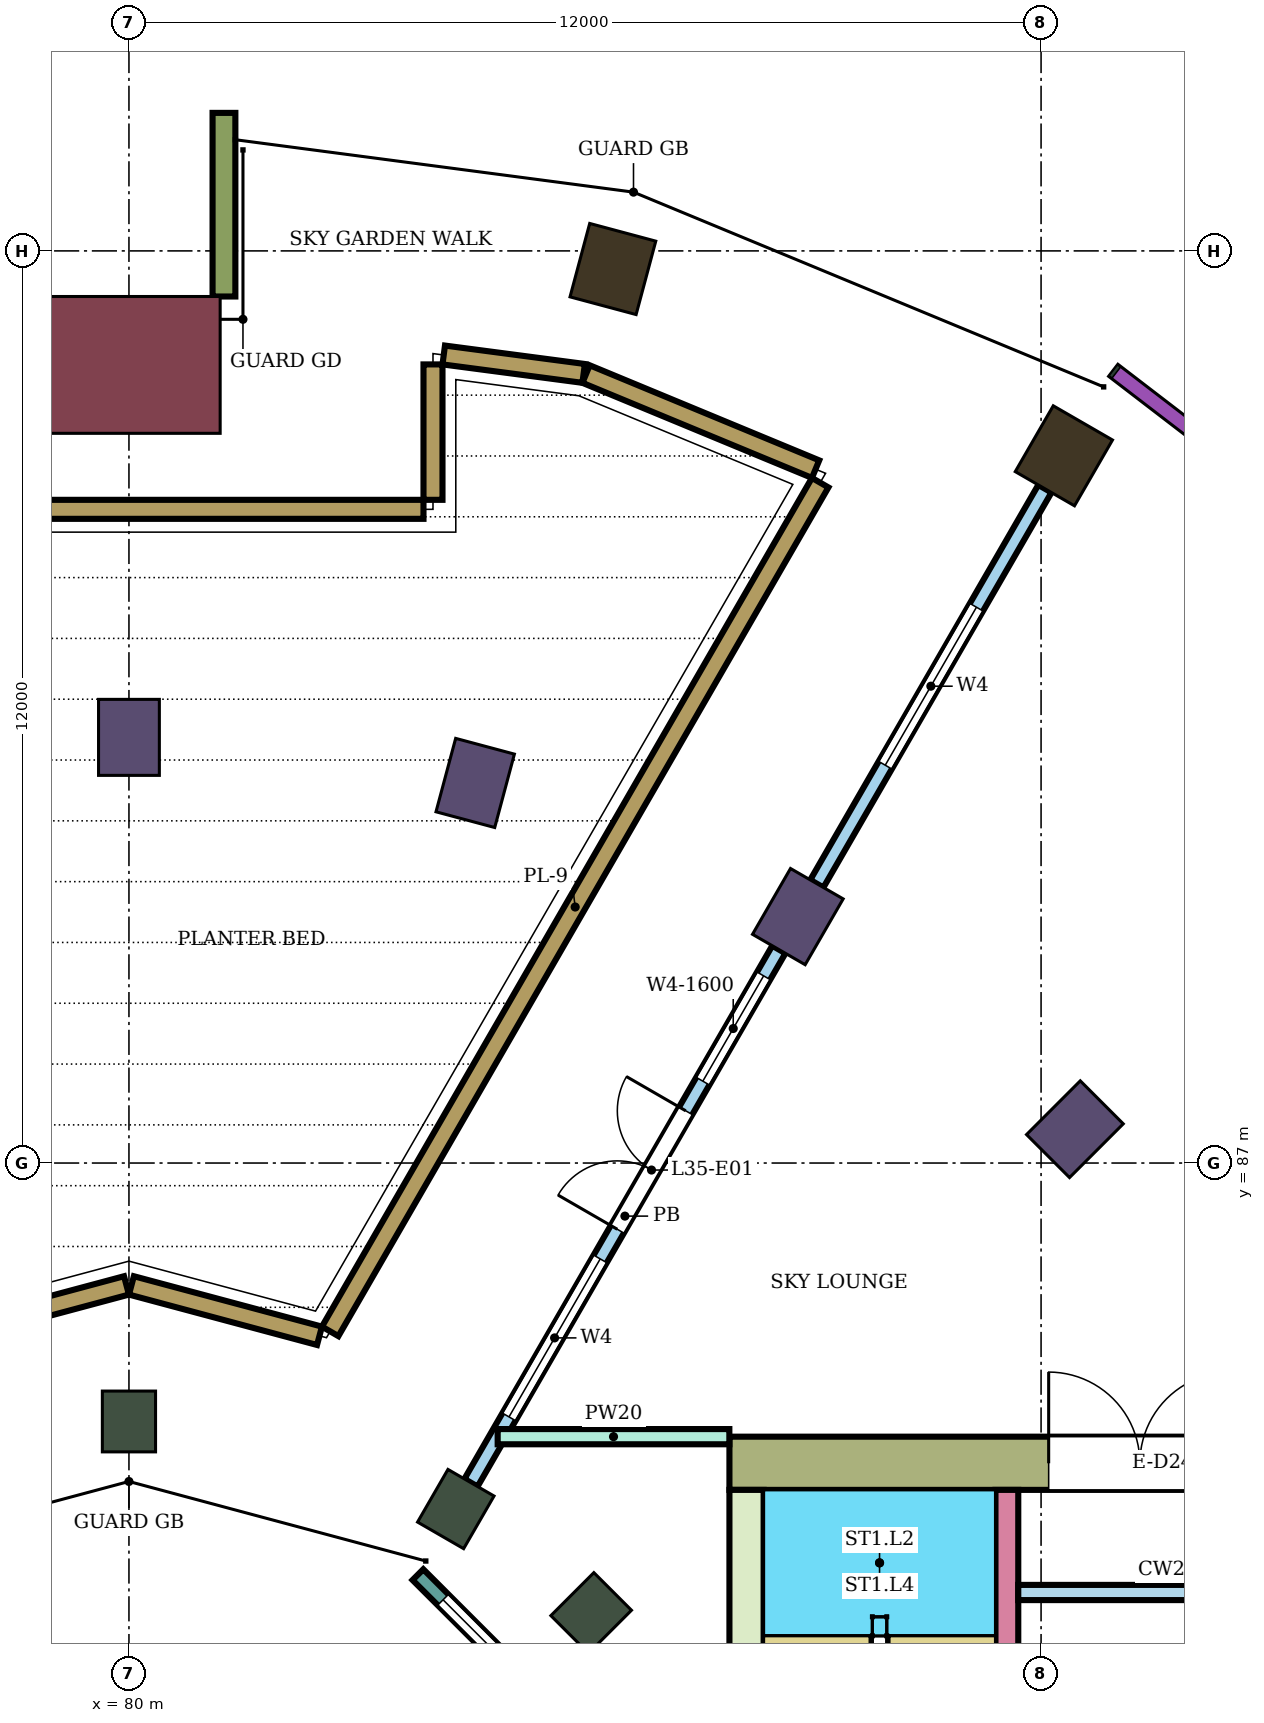
"""IFC4 building model, lengths in metres.
Left out: names, types, materials, properties, quantities, classifications, styles, units other than length and angle.
Written with IfcOpenShell. Run it as: python <this file> out.ifc"""

import sys

from ifc_helpers import new_model, si_unit, direction, frame, frame_2d, origin, origin_2d, place, context, subcontext, project, spatial, rectangle, extrude, element, fill, save


model = new_model("IFC4")
c1 = context("Model", 3, precision=1e-05, world=origin(), true_north=direction((0.0, 1.0)))
c2 = subcontext(c1, "Body", "Model", "MODEL_VIEW")
j1 = project(units=[si_unit("LENGTHUNIT", "METRE"), si_unit("PLANEANGLEUNIT", "RADIAN")], contexts=[c1])
p1 = place(None, origin())
s1 = spatial("IfcSite", under=j1, at=p1, CompositionType="ELEMENT")
p2 = place(p1, origin())
s2 = spatial("IfcBuilding", under=s1, at=p2, CompositionType="ELEMENT")
p3 = place(p2, frame((0.0, 0.0, 149.7)))
s3 = spatial("IfcBuildingStorey", under=s2, at=p3, CompositionType="ELEMENT", Elevation=149.7)
for number, where, z_axis, x_axis in (
    (1, (92.3, 96.304, 0.0), (0.0, 0.0, 1.0), (0.5, 0.866, 0.0)),
    (2, (86.367, 98.762, 0.0), (0.0, 0.0, 1.0), (0.259, 0.966, 0.0)),
):
    element("IfcColumn", number, at=place(p3, frame(where, z_axis=z_axis, x_axis=x_axis)), inside=s3, PredefinedType="COLUMN", context=c2, shape_type="SweptSolid", body=[
        extrude(rectangle(XDim=1.0, YDim=0.9, at=origin_2d()), origin(), (0.0, 0.0, 1.0), 8.0),
    ])
for number, where, z_axis, x_axis in (
    (3, (92.445, 87.445, 0.0), (0.0, 0.0, 1.0), (0.707, 0.707, 0.0)),
    (4, (88.8, 90.242, 0.0), (0.0, 0.0, 1.0), (0.5, 0.866, 0.0)),
    (5, (84.555, 92.0, 0.0), (0.0, 0.0, 1.0), (0.259, 0.966, 0.0)),
    (6, (80.0, 92.6, 0.0), (0.0, 0.0, 1.0), (0.0, 1.0, 0.0)),
):
    element("IfcColumn", number, at=place(p3, frame(where, z_axis=z_axis, x_axis=x_axis)), inside=s3, PredefinedType="COLUMN", context=c2, shape_type="SweptSolid", body=[
        extrude(rectangle(XDim=1.0, YDim=0.8, at=origin_2d()), origin(), (0.0, 0.0, 1.0), 8.0),
    ])
for number, where, z_axis, x_axis in (
    (7, (86.081, 81.081, 0.0), (0.0, 0.0, 1.0), (0.707, 0.707, 0.0)),
    (8, (84.3, 82.448, 0.0), (0.0, 0.0, 1.0), (0.5, 0.866, 0.0)),
    (9, (80.0, 83.6, 0.0), (0.0, 0.0, 1.0), (0.0, 1.0, 0.0)),
):
    element("IfcColumn", number, at=place(p3, frame(where, z_axis=z_axis, x_axis=x_axis)), inside=s3, PredefinedType="COLUMN", context=c2, shape_type="SweptSolid", body=[
        extrude(rectangle(XDim=0.8, YDim=0.7, at=origin_2d()), origin(), (0.0, 0.0, 1.0), 8.0),
    ])
p4 = place(p3, frame((80.0, 97.5, 0.0), z_axis=(0.0, 0.0, 1.0), x_axis=(0.0, 1.0, 0.0)))
e10 = element("IfcColumn", 10, at=p4, inside=s3, PredefinedType="COLUMN", context=c2, shape_type="SweptSolid", body=[
    extrude(rectangle(XDim=1.8, YDim=2.4, at=origin_2d()), origin(), (0.0, 0.0, 1.0), 8.0),
])
p5 = place(p3, frame((87.9, 83.05, 0.0), z_axis=(0.0, 0.0, 1.0), x_axis=(1.0, 0.0, 0.0)))
e11 = element("IfcWall", 11, at=p5, inside=s3, PredefinedType="SHEAR", context=c2, shape_type="SweptSolid", body=[
    extrude(rectangle(XDim=14.8, YDim=0.7, at=frame_2d((7.4, 0.0))), origin(), (0.0, 0.0, 1.0), 7.68),
])
p6 = place(p5, frame((4.2, 0.0, 0.0)))
e12 = element("IfcOpeningElement", 12, at=p6, cuts=e11, PredefinedType="OPENING", context=c2, shape_type="SweptSolid", body=[
    extrude(rectangle(XDim=2.4, YDim=2.4, at=frame_2d((1.2, 1.2))), frame((0.0, 0.36, 0.0), z_axis=(0.0, -1.0, 0.0), x_axis=(1.0, 0.0, 0.0)), (0.0, 0.0, 1.0), 0.72),
])
p7 = place(p3, frame((88.125, 75.0, 0.0), z_axis=(0.0, 0.0, 1.0), x_axis=(0.0, 1.0, 0.0)))
e13 = element("IfcWall", 13, at=p7, inside=s3, PredefinedType="SHEAR", context=c2, shape_type="SweptSolid", body=[
    extrude(rectangle(XDim=7.7, YDim=0.45, at=frame_2d((3.85, 0.0))), origin(), (0.0, 0.0, 1.0), 7.68),
])
p8 = place(p3, frame((91.55, 75.0, 0.0), z_axis=(0.0, 0.0, 1.0), x_axis=(0.0, 1.0, 0.0)))
e14 = element("IfcWall", 14, at=p8, inside=s3, PredefinedType="SHEAR", context=c2, shape_type="SweptSolid", body=[
    extrude(rectangle(XDim=7.7, YDim=0.3, at=frame_2d((3.85, 0.0))), origin(), (0.0, 0.0, 1.0), 7.68),
])
p9 = place(p8, frame((1.85, 0.0, 0.0)))
e15 = element("IfcOpeningElement", 15, at=p9, cuts=e14, PredefinedType="OPENING", context=c2, shape_type="SweptSolid", body=[
    extrude(rectangle(XDim=0.9, YDim=2.1, at=frame_2d((0.45, 1.05))), frame((0.0, 0.16, 0.0), z_axis=(0.0, -1.0, 0.0), x_axis=(1.0, 0.0, 0.0)), (0.0, 0.0, 1.0), 0.32),
])
p10 = place(p3, frame((91.7, 81.35, 0.0), z_axis=(0.0, 0.0, 1.0), x_axis=(1.0, 0.0, 0.0)))
e16 = element("IfcWall", 16, at=p10, inside=s3, PredefinedType="SHEAR", context=c2, shape_type="SweptSolid", body=[
    extrude(rectangle(XDim=4.5, YDim=0.2, at=frame_2d((2.25, 0.0))), origin(), (0.0, 0.0, 1.0), 7.68),
])
p11 = place(p3, frame((81.25, 98.4, 0.0), z_axis=(0.0, 0.0, 1.0), x_axis=(0.0, 1.0, 0.0)))
e17 = element("IfcWall", 17, at=p11, inside=s3, PredefinedType="NOTDEFINED", context=c2, shape_type="SweptSolid", body=[
    extrude(rectangle(XDim=2.416, YDim=0.3, at=frame_2d((1.208, 0.0))), origin(), (0.0, 0.0, 1.0), 8.0),
])
p12 = place(p3, frame((86.585, 78.802, 0.0), z_axis=(0.0, 0.0, 1.0), x_axis=(-0.707106781187, 0.707106781187, 0.0)))
e18 = element("IfcWall", 18, at=p12, inside=s3, PredefinedType="NOTDEFINED", context=c2, shape_type="SweptSolid", body=[
    extrude(rectangle(XDim=3.936, YDim=0.2, at=frame_2d((1.968, 0.0))), origin(), (0.0, 0.0, 1.0), 8.0),
])
p13 = place(p12, frame((0.468, 0.0, 0.9)))
e19 = element("IfcOpeningElement", 19, at=p13, cuts=e18, PredefinedType="OPENING", context=c2, shape_type="SweptSolid", body=[
    extrude(rectangle(XDim=3.0, YDim=2.3, at=frame_2d((1.5, 1.15))), frame((0.0, 0.11, 0.0), z_axis=(0.0, -1.0, 0.0), x_axis=(1.0, 0.0, 0.0)), (0.0, 0.0, 1.0), 0.22),
])
for number, where, z_axis, x_axis in (
    (20, (77.493, 84.727, 0.0), (0.0, 0.0, 1.0), (0.966, 0.259, 0.0)),
    (21, (80.032, 85.39, 0.0), (0.0, 0.0, 1.0), (0.966, -0.259, 0.0)),
):
    element("IfcWall", number, at=place(p3, frame(where, z_axis=z_axis, x_axis=x_axis)), inside=s3, PredefinedType="USERDEFINED", context=c2, shape_type="SweptSolid", body=[
        extrude(rectangle(XDim=2.562, YDim=0.25, at=frame_2d((1.281, 0.0))), origin(), (0.0, 0.0, 1.0), 0.6),
    ])
p14 = place(p3, frame((82.647, 84.785, 0.0), z_axis=(0.0, 0.0, 1.0), x_axis=(0.499992370413, 0.866029808684, 0.0)))
e22 = element("IfcWall", 22, at=p14, inside=s3, PredefinedType="USERDEFINED", context=c2, shape_type="SweptSolid", body=[
    extrude(rectangle(XDim=12.893, YDim=0.25, at=frame_2d((6.446, 0.0))), origin(), (0.0, 0.0, 1.0), 0.6),
])
p15 = place(p3, frame((89.033, 96.129, 0.0), z_axis=(0.0, 0.0, 1.0), x_axis=(-0.923863886655, 0.382721202621, 0.0)))
e23 = element("IfcWall", 23, at=p15, inside=s3, PredefinedType="USERDEFINED", context=c2, shape_type="SweptSolid", body=[
    extrude(rectangle(XDim=3.269, YDim=0.25, at=frame_2d((1.634, 0.0))), origin(), (0.0, 0.0, 1.0), 0.6),
])
p16 = place(p3, frame((85.982, 97.388, 0.0), z_axis=(0.0, 0.0, 1.0), x_axis=(-0.991436829887, 0.130587182926, 0.0)))
e24 = element("IfcWall", 24, at=p16, inside=s3, PredefinedType="USERDEFINED", context=c2, shape_type="SweptSolid", body=[
    extrude(rectangle(XDim=1.856, YDim=0.25, at=frame_2d((0.928, 0.0))), origin(), (0.0, 0.0, 1.0), 0.6),
])
p17 = place(p3, frame((84.0, 97.507, 0.0), z_axis=(0.0, 0.0, 1.0), x_axis=(0.0, -1.0, 0.0)))
e25 = element("IfcWall", 25, at=p17, inside=s3, PredefinedType="USERDEFINED", context=c2, shape_type="SweptSolid", body=[
    extrude(rectangle(XDim=1.781, YDim=0.25, at=frame_2d((0.891, 0.0))), origin(), (0.0, 0.0, 1.0), 0.6),
])
p18 = place(p3, frame((83.875, 95.6, 0.0), z_axis=(0.0, 0.0, 1.0), x_axis=(-1.0, 0.0, 0.0)))
e26 = element("IfcWall", 26, at=p18, inside=s3, PredefinedType="USERDEFINED", context=c2, shape_type="SweptSolid", body=[
    extrude(rectangle(XDim=7.75, YDim=0.25, at=frame_2d((3.875, 0.0))), origin(), (0.0, 0.0, 1.0), 0.6),
])
p19 = place(p3, frame((84.5, 82.794, 0.0), z_axis=(0.0, 0.0, 1.0), x_axis=(0.499999880539, 0.866025472755, 0.0)))
e27 = element("IfcWall", 27, at=p19, inside=s3, PredefinedType="NOTDEFINED", context=c2, shape_type="SweptSolid", body=[
    extrude(rectangle(XDim=8.1, YDim=0.2, at=frame_2d((4.05, 0.0))), origin(), (0.0, 0.0, 1.0), 8.0),
])
p20 = place(p19, frame((1.0, 0.0, 0.3)))
e28 = element("IfcOpeningElement", 28, at=p20, cuts=e27, PredefinedType="OPENING", context=c2, shape_type="SweptSolid", body=[
    extrude(rectangle(XDim=2.4, YDim=3.6, at=frame_2d((1.2, 1.8))), frame((0.0, 0.11, 0.0), z_axis=(0.0, -1.0, 0.0), x_axis=(1.0, 0.0, 0.0)), (0.0, 0.0, 1.0), 0.22),
])
p21 = place(p19, frame((3.85, 0.0, 0.0)))
e29 = element("IfcOpeningElement", 29, at=p21, cuts=e27, PredefinedType="OPENING", context=c2, shape_type="SweptSolid", body=[
    extrude(rectangle(XDim=1.8, YDim=2.4, at=frame_2d((0.9, 1.2))), frame((0.0, 0.11, 0.0), z_axis=(0.0, -1.0, 0.0), x_axis=(1.0, 0.0, 0.0)), (0.0, 0.0, 1.0), 0.22),
])
p22 = place(p19, frame((6.1, 0.0, 0.3)))
e30 = element("IfcOpeningElement", 30, at=p22, cuts=e27, PredefinedType="OPENING", context=c2, shape_type="SweptSolid", body=[
    extrude(rectangle(XDim=1.6, YDim=3.6, at=frame_2d((0.8, 1.8))), frame((0.0, 0.11, 0.0), z_axis=(0.0, -1.0, 0.0), x_axis=(1.0, 0.0, 0.0)), (0.0, 0.0, 1.0), 0.22),
])
p23 = place(p3, frame((89.05, 90.675, 0.0), z_axis=(0.0, 0.0, 1.0), x_axis=(0.500007758305, 0.866020924479, 0.0)))
e31 = element("IfcWall", 31, at=p23, inside=s3, PredefinedType="NOTDEFINED", context=c2, shape_type="SweptSolid", body=[
    extrude(rectangle(XDim=6.0, YDim=0.2, at=frame_2d((3.0, 0.0))), origin(), (0.0, 0.0, 1.0), 8.0),
])
p24 = place(p23, frame((1.8, 0.0, 0.3)))
e32 = element("IfcOpeningElement", 32, at=p24, cuts=e31, PredefinedType="OPENING", context=c2, shape_type="SweptSolid", body=[
    extrude(rectangle(XDim=2.4, YDim=3.6, at=frame_2d((1.2, 1.8))), frame((0.0, 0.11, 0.0), z_axis=(0.0, -1.0, 0.0), x_axis=(1.0, 0.0, 0.0)), (0.0, 0.0, 1.0), 0.22),
])
p25 = place(p3, frame((84.851, 83.4, 0.0), z_axis=(0.0, 0.0, 1.0), x_axis=(1.0, 0.0, 0.0)))
e33 = element("IfcWall", 33, at=p25, inside=s3, PredefinedType="PARTITIONING", context=c2, shape_type="SweptSolid", body=[
    extrude(rectangle(XDim=3.048, YDim=0.2, at=frame_2d((1.524, 0.0))), origin(), (0.0, 0.0, 1.0), 7.55),
])
p26 = place(p13, origin())
e34 = element("IfcWindow", 34, at=p26, inside=s3, PartitioningType="SINGLE_PANEL", PredefinedType="WINDOW", context=c2, shape_type="SweptSolid", body=[
    extrude(rectangle(XDim=3.0, YDim=2.3, at=frame_2d((1.5, 1.15))), frame((0.0, 0.03, 0.0), z_axis=(0.0, -1.0, 0.0), x_axis=(1.0, 0.0, 0.0)), (0.0, 0.0, 1.0), 0.06),
])
fill(e19, e34)
p27 = place(p20, origin())
e35 = element("IfcWindow", 35, at=p27, inside=s3, PartitioningType="SINGLE_PANEL", PredefinedType="WINDOW", context=c2, shape_type="SweptSolid", body=[
    extrude(rectangle(XDim=2.4, YDim=3.6, at=frame_2d((1.2, 1.8))), frame((0.0, 0.03, 0.0), z_axis=(0.0, -1.0, 0.0), x_axis=(1.0, 0.0, 0.0)), (0.0, 0.0, 1.0), 0.06),
])
fill(e28, e35)
p28 = place(p21, origin())
e36 = element("IfcDoor", 36, at=p28, inside=s3, OperationType="DOUBLE_DOOR_SINGLE_SWING", PredefinedType="DOOR", context=c2, shape_type="SweptSolid", body=[
    extrude(rectangle(XDim=1.8, YDim=2.4, at=frame_2d((0.9, 1.2))), frame((0.0, 0.025, 0.0), z_axis=(0.0, -1.0, 0.0), x_axis=(1.0, 0.0, 0.0)), (0.0, 0.0, 1.0), 0.05),
])
fill(e29, e36)
p29 = place(p22, origin())
e37 = element("IfcWindow", 37, at=p29, inside=s3, PartitioningType="SINGLE_PANEL", PredefinedType="WINDOW", context=c2, shape_type="SweptSolid", body=[
    extrude(rectangle(XDim=1.6, YDim=3.6, at=frame_2d((0.8, 1.8))), frame((0.0, 0.03, 0.0), z_axis=(0.0, -1.0, 0.0), x_axis=(1.0, 0.0, 0.0)), (0.0, 0.0, 1.0), 0.06),
])
fill(e30, e37)
p30 = place(p24, origin())
e38 = element("IfcWindow", 38, at=p30, inside=s3, PartitioningType="SINGLE_PANEL", PredefinedType="WINDOW", context=c2, shape_type="SweptSolid", body=[
    extrude(rectangle(XDim=2.4, YDim=3.6, at=frame_2d((1.2, 1.8))), frame((0.0, 0.03, 0.0), z_axis=(0.0, -1.0, 0.0), x_axis=(1.0, 0.0, 0.0)), (0.0, 0.0, 1.0), 0.06),
])
fill(e32, e38)
p31 = place(p6, origin())
e39 = element("IfcDoor", 39, at=p31, inside=s3, OperationType="DOUBLE_DOOR_SINGLE_SWING", PredefinedType="DOOR", context=c2, shape_type="SweptSolid", body=[
    extrude(rectangle(XDim=2.4, YDim=2.4, at=frame_2d((1.2, 1.2))), frame((0.0, 0.025, 0.0), z_axis=(0.0, -1.0, 0.0), x_axis=(1.0, 0.0, 0.0)), (0.0, 0.0, 1.0), 0.05),
])
fill(e12, e39)
save(model, sys.argv[1])
